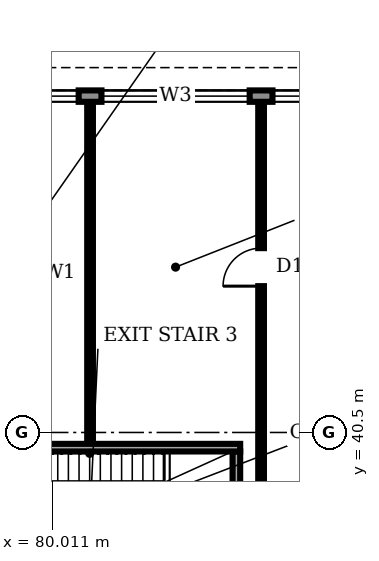
"""IFC4 building model, lengths in metres.
Left out: names, types, materials, properties, quantities, classifications, styles, units other than length and angle.
Written with IfcOpenShell. Run it as: python <this file> out.ifc"""

import sys

from ifc_helpers import new_model, si_unit, direction, frame, frame_2d, origin, place, context, subcontext, project, spatial, rectangle, extrude, element, fill, save


model = new_model("IFC4")
c1 = context("Model", 3, precision=1e-05, world=origin(), true_north=direction((0.0, 1.0)))
c2 = subcontext(c1, "Body", "Model", "MODEL_VIEW")
j1 = project(units=[si_unit("LENGTHUNIT", "METRE"), si_unit("PLANEANGLEUNIT", "RADIAN")], contexts=[c1])
p1 = place(None, origin())
s1 = spatial("IfcSite", under=j1, at=p1, CompositionType="ELEMENT")
p2 = place(p1, origin())
s2 = spatial("IfcBuilding", under=s1, at=p2, CompositionType="ELEMENT")
p3 = place(p2, frame((0.0, 0.0, 16.0)))
s3 = spatial("IfcBuildingStorey", under=s2, at=p3, CompositionType="ELEMENT", Elevation=16.0)
p4 = place(p3, frame((98.98, 49.35, 0.0), z_axis=(0.0, 0.0, 1.0), x_axis=(-1.0, 0.0, 0.0)))
e1 = element("IfcWall", 1, at=p4, inside=s3, PredefinedType="STANDARD", context=c2, shape_type="SweptSolid", body=[
    extrude(rectangle(XDim=98.96, YDim=0.3, at=frame_2d((49.48, 0.0))), origin(), (0.0, 0.0, 1.0), 4.7),
])
p5 = place(p4, frame((94.78, 0.0, 0.95)))
e2 = element("IfcOpeningElement", 2, at=p5, cuts=e1, PredefinedType="OPENING", context=c2, shape_type="SweptSolid", body=[
    extrude(rectangle(XDim=3.9, YDim=1.8, at=frame_2d((1.95, 0.9))), frame((0.0, 0.16, 0.0), z_axis=(0.0, -1.0, 0.0), x_axis=(1.0, 0.0, 0.0)), (0.0, 0.0, 1.0), 0.32),
])
p6 = place(p4, frame((90.28, 0.0, 0.95)))
e3 = element("IfcOpeningElement", 3, at=p6, cuts=e1, PredefinedType="OPENING", context=c2, shape_type="SweptSolid", body=[
    extrude(rectangle(XDim=3.9, YDim=1.8, at=frame_2d((1.95, 0.9))), frame((0.0, 0.16, 0.0), z_axis=(0.0, -1.0, 0.0), x_axis=(1.0, 0.0, 0.0)), (0.0, 0.0, 1.0), 0.32),
])
p7 = place(p4, frame((85.78, 0.0, 0.95)))
e4 = element("IfcOpeningElement", 4, at=p7, cuts=e1, PredefinedType="OPENING", context=c2, shape_type="SweptSolid", body=[
    extrude(rectangle(XDim=3.9, YDim=1.8, at=frame_2d((1.95, 0.9))), frame((0.0, 0.16, 0.0), z_axis=(0.0, -1.0, 0.0), x_axis=(1.0, 0.0, 0.0)), (0.0, 0.0, 1.0), 0.32),
])
p8 = place(p4, frame((81.28, 0.0, 0.95)))
e5 = element("IfcOpeningElement", 5, at=p8, cuts=e1, PredefinedType="OPENING", context=c2, shape_type="SweptSolid", body=[
    extrude(rectangle(XDim=3.9, YDim=1.8, at=frame_2d((1.95, 0.9))), frame((0.0, 0.16, 0.0), z_axis=(0.0, -1.0, 0.0), x_axis=(1.0, 0.0, 0.0)), (0.0, 0.0, 1.0), 0.32),
])
p9 = place(p4, frame((76.78, 0.0, 0.95)))
e6 = element("IfcOpeningElement", 6, at=p9, cuts=e1, PredefinedType="OPENING", context=c2, shape_type="SweptSolid", body=[
    extrude(rectangle(XDim=3.9, YDim=1.8, at=frame_2d((1.95, 0.9))), frame((0.0, 0.16, 0.0), z_axis=(0.0, -1.0, 0.0), x_axis=(1.0, 0.0, 0.0)), (0.0, 0.0, 1.0), 0.32),
])
p10 = place(p4, frame((72.28, 0.0, 0.95)))
e7 = element("IfcOpeningElement", 7, at=p10, cuts=e1, PredefinedType="OPENING", context=c2, shape_type="SweptSolid", body=[
    extrude(rectangle(XDim=3.9, YDim=1.8, at=frame_2d((1.95, 0.9))), frame((0.0, 0.16, 0.0), z_axis=(0.0, -1.0, 0.0), x_axis=(1.0, 0.0, 0.0)), (0.0, 0.0, 1.0), 0.32),
])
p11 = place(p4, frame((67.78, 0.0, 0.95)))
e8 = element("IfcOpeningElement", 8, at=p11, cuts=e1, PredefinedType="OPENING", context=c2, shape_type="SweptSolid", body=[
    extrude(rectangle(XDim=3.9, YDim=1.8, at=frame_2d((1.95, 0.9))), frame((0.0, 0.16, 0.0), z_axis=(0.0, -1.0, 0.0), x_axis=(1.0, 0.0, 0.0)), (0.0, 0.0, 1.0), 0.32),
])
p12 = place(p4, frame((63.28, 0.0, 0.95)))
e9 = element("IfcOpeningElement", 9, at=p12, cuts=e1, PredefinedType="OPENING", context=c2, shape_type="SweptSolid", body=[
    extrude(rectangle(XDim=3.9, YDim=1.8, at=frame_2d((1.95, 0.9))), frame((0.0, 0.16, 0.0), z_axis=(0.0, -1.0, 0.0), x_axis=(1.0, 0.0, 0.0)), (0.0, 0.0, 1.0), 0.32),
])
p13 = place(p4, frame((58.78, 0.0, 0.95)))
e10 = element("IfcOpeningElement", 10, at=p13, cuts=e1, PredefinedType="OPENING", context=c2, shape_type="SweptSolid", body=[
    extrude(rectangle(XDim=3.9, YDim=1.8, at=frame_2d((1.95, 0.9))), frame((0.0, 0.16, 0.0), z_axis=(0.0, -1.0, 0.0), x_axis=(1.0, 0.0, 0.0)), (0.0, 0.0, 1.0), 0.32),
])
p14 = place(p4, frame((54.28, 0.0, 0.95)))
e11 = element("IfcOpeningElement", 11, at=p14, cuts=e1, PredefinedType="OPENING", context=c2, shape_type="SweptSolid", body=[
    extrude(rectangle(XDim=3.9, YDim=1.8, at=frame_2d((1.95, 0.9))), frame((0.0, 0.16, 0.0), z_axis=(0.0, -1.0, 0.0), x_axis=(1.0, 0.0, 0.0)), (0.0, 0.0, 1.0), 0.32),
])
p15 = place(p4, frame((49.78, 0.0, 0.95)))
e12 = element("IfcOpeningElement", 12, at=p15, cuts=e1, PredefinedType="OPENING", context=c2, shape_type="SweptSolid", body=[
    extrude(rectangle(XDim=3.9, YDim=1.8, at=frame_2d((1.95, 0.9))), frame((0.0, 0.16, 0.0), z_axis=(0.0, -1.0, 0.0), x_axis=(1.0, 0.0, 0.0)), (0.0, 0.0, 1.0), 0.32),
])
p16 = place(p4, frame((45.28, 0.0, 0.95)))
e13 = element("IfcOpeningElement", 13, at=p16, cuts=e1, PredefinedType="OPENING", context=c2, shape_type="SweptSolid", body=[
    extrude(rectangle(XDim=3.9, YDim=1.8, at=frame_2d((1.95, 0.9))), frame((0.0, 0.16, 0.0), z_axis=(0.0, -1.0, 0.0), x_axis=(1.0, 0.0, 0.0)), (0.0, 0.0, 1.0), 0.32),
])
p17 = place(p4, frame((40.78, 0.0, 0.95)))
e14 = element("IfcOpeningElement", 14, at=p17, cuts=e1, PredefinedType="OPENING", context=c2, shape_type="SweptSolid", body=[
    extrude(rectangle(XDim=3.9, YDim=1.8, at=frame_2d((1.95, 0.9))), frame((0.0, 0.16, 0.0), z_axis=(0.0, -1.0, 0.0), x_axis=(1.0, 0.0, 0.0)), (0.0, 0.0, 1.0), 0.32),
])
p18 = place(p4, frame((36.28, 0.0, 0.95)))
e15 = element("IfcOpeningElement", 15, at=p18, cuts=e1, PredefinedType="OPENING", context=c2, shape_type="SweptSolid", body=[
    extrude(rectangle(XDim=3.9, YDim=1.8, at=frame_2d((1.95, 0.9))), frame((0.0, 0.16, 0.0), z_axis=(0.0, -1.0, 0.0), x_axis=(1.0, 0.0, 0.0)), (0.0, 0.0, 1.0), 0.32),
])
p19 = place(p4, frame((31.78, 0.0, 0.95)))
e16 = element("IfcOpeningElement", 16, at=p19, cuts=e1, PredefinedType="OPENING", context=c2, shape_type="SweptSolid", body=[
    extrude(rectangle(XDim=3.9, YDim=1.8, at=frame_2d((1.95, 0.9))), frame((0.0, 0.16, 0.0), z_axis=(0.0, -1.0, 0.0), x_axis=(1.0, 0.0, 0.0)), (0.0, 0.0, 1.0), 0.32),
])
p20 = place(p4, frame((27.28, 0.0, 0.95)))
e17 = element("IfcOpeningElement", 17, at=p20, cuts=e1, PredefinedType="OPENING", context=c2, shape_type="SweptSolid", body=[
    extrude(rectangle(XDim=3.9, YDim=1.8, at=frame_2d((1.95, 0.9))), frame((0.0, 0.16, 0.0), z_axis=(0.0, -1.0, 0.0), x_axis=(1.0, 0.0, 0.0)), (0.0, 0.0, 1.0), 0.32),
])
p21 = place(p4, frame((22.78, 0.0, 0.95)))
e18 = element("IfcOpeningElement", 18, at=p21, cuts=e1, PredefinedType="OPENING", context=c2, shape_type="SweptSolid", body=[
    extrude(rectangle(XDim=3.9, YDim=1.8, at=frame_2d((1.95, 0.9))), frame((0.0, 0.16, 0.0), z_axis=(0.0, -1.0, 0.0), x_axis=(1.0, 0.0, 0.0)), (0.0, 0.0, 1.0), 0.32),
])
p22 = place(p4, frame((18.28, 0.0, 0.95)))
e19 = element("IfcOpeningElement", 19, at=p22, cuts=e1, PredefinedType="OPENING", context=c2, shape_type="SweptSolid", body=[
    extrude(rectangle(XDim=3.9, YDim=1.8, at=frame_2d((1.95, 0.9))), frame((0.0, 0.16, 0.0), z_axis=(0.0, -1.0, 0.0), x_axis=(1.0, 0.0, 0.0)), (0.0, 0.0, 1.0), 0.32),
])
p23 = place(p4, frame((13.78, 0.0, 0.95)))
e20 = element("IfcOpeningElement", 20, at=p23, cuts=e1, PredefinedType="OPENING", context=c2, shape_type="SweptSolid", body=[
    extrude(rectangle(XDim=3.9, YDim=1.8, at=frame_2d((1.95, 0.9))), frame((0.0, 0.16, 0.0), z_axis=(0.0, -1.0, 0.0), x_axis=(1.0, 0.0, 0.0)), (0.0, 0.0, 1.0), 0.32),
])
p24 = place(p4, frame((9.28, 0.0, 0.95)))
e21 = element("IfcOpeningElement", 21, at=p24, cuts=e1, PredefinedType="OPENING", context=c2, shape_type="SweptSolid", body=[
    extrude(rectangle(XDim=3.9, YDim=1.8, at=frame_2d((1.95, 0.9))), frame((0.0, 0.16, 0.0), z_axis=(0.0, -1.0, 0.0), x_axis=(1.0, 0.0, 0.0)), (0.0, 0.0, 1.0), 0.32),
])
p25 = place(p4, frame((4.78, 0.0, 0.95)))
e22 = element("IfcOpeningElement", 22, at=p25, cuts=e1, PredefinedType="OPENING", context=c2, shape_type="SweptSolid", body=[
    extrude(rectangle(XDim=3.9, YDim=1.8, at=frame_2d((1.95, 0.9))), frame((0.0, 0.16, 0.0), z_axis=(0.0, -1.0, 0.0), x_axis=(1.0, 0.0, 0.0)), (0.0, 0.0, 1.0), 0.32),
])
p26 = place(p3, frame((81.0, 40.2, 0.0), z_axis=(0.0, 0.0, 1.0), x_axis=(0.0, 1.0, 0.0)))
e23 = element("IfcWall", 23, at=p26, inside=s3, PredefinedType="PARTITIONING", context=c2, shape_type="SweptSolid", body=[
    extrude(rectangle(XDim=9.0, YDim=0.15, at=frame_2d((4.5, 0.0))), origin(), (0.0, 0.0, 1.0), 4.7),
])
p27 = place(p3, frame((85.5, 31.5, 0.0), z_axis=(0.0, 0.0, 1.0), x_axis=(0.0, 1.0, 0.0)))
e24 = element("IfcWall", 24, at=p27, inside=s3, PredefinedType="PARTITIONING", context=c2, shape_type="SweptSolid", body=[
    extrude(rectangle(XDim=17.7, YDim=0.15, at=frame_2d((8.85, 0.0))), origin(), (0.0, 0.0, 1.0), 4.7),
])
p28 = place(p27, frame((12.85, 0.0, 0.0)))
e25 = element("IfcOpeningElement", 25, at=p28, cuts=e24, PredefinedType="OPENING", context=c2, shape_type="SweptSolid", body=[
    extrude(rectangle(XDim=1.0, YDim=2.1, at=frame_2d((0.5, 1.05))), frame((0.0, 0.085, 0.0), z_axis=(0.0, -1.0, 0.0), x_axis=(1.0, 0.0, 0.0)), (0.0, 0.0, 1.0), 0.17),
])
p29 = place(p3, frame((77.05, 40.1, 0.0), z_axis=(0.0, 0.0, 1.0), x_axis=(1.0, 0.0, 0.0)))
e26 = element("IfcWall", 26, at=p29, inside=s3, PredefinedType="SOLIDWALL", context=c2, shape_type="SweptSolid", body=[
    extrude(rectangle(XDim=7.9, YDim=0.2, at=frame_2d((3.95, 0.0))), origin(), (0.0, 0.0, 1.0), 4.7),
])
p30 = place(p3, frame((84.85, 36.6, 0.0), z_axis=(0.0, 0.0, 1.0), x_axis=(0.0, 1.0, 0.0)))
e27 = element("IfcWall", 27, at=p30, inside=s3, PredefinedType="SOLIDWALL", context=c2, shape_type="SweptSolid", body=[
    extrude(rectangle(XDim=3.4, YDim=0.2, at=frame_2d((1.7, 0.0))), origin(), (0.0, 0.0, 1.0), 4.7),
])
p31 = place(p22, origin())
e28 = element("IfcWindow", 28, at=p31, inside=s3, PartitioningType="SINGLE_PANEL", PredefinedType="WINDOW", context=c2, shape_type="SweptSolid", body=[
    extrude(rectangle(XDim=3.9, YDim=1.8, at=frame_2d((1.95, 0.9))), frame((0.0, 0.03, 0.0), z_axis=(0.0, -1.0, 0.0), x_axis=(1.0, 0.0, 0.0)), (0.0, 0.0, 1.0), 0.06),
])
fill(e19, e28)
p32 = place(p23, origin())
e29 = element("IfcWindow", 29, at=p32, inside=s3, PartitioningType="SINGLE_PANEL", PredefinedType="WINDOW", context=c2, shape_type="SweptSolid", body=[
    extrude(rectangle(XDim=3.9, YDim=1.8, at=frame_2d((1.95, 0.9))), frame((0.0, 0.03, 0.0), z_axis=(0.0, -1.0, 0.0), x_axis=(1.0, 0.0, 0.0)), (0.0, 0.0, 1.0), 0.06),
])
fill(e20, e29)
p33 = place(p24, origin())
e30 = element("IfcWindow", 30, at=p33, inside=s3, PartitioningType="SINGLE_PANEL", PredefinedType="WINDOW", context=c2, shape_type="SweptSolid", body=[
    extrude(rectangle(XDim=3.9, YDim=1.8, at=frame_2d((1.95, 0.9))), frame((0.0, 0.03, 0.0), z_axis=(0.0, -1.0, 0.0), x_axis=(1.0, 0.0, 0.0)), (0.0, 0.0, 1.0), 0.06),
])
fill(e21, e30)
p34 = place(p28, origin())
e31 = element("IfcDoor", 31, at=p34, inside=s3, OperationType="SINGLE_SWING_LEFT", PredefinedType="DOOR", context=c2, shape_type="SweptSolid", body=[
    extrude(rectangle(XDim=1.0, YDim=2.1, at=frame_2d((0.5, 1.05))), frame((0.0, 0.025, 0.0), z_axis=(0.0, -1.0, 0.0), x_axis=(1.0, 0.0, 0.0)), (0.0, 0.0, 1.0), 0.05),
])
fill(e25, e31)
save(model, sys.argv[1])
